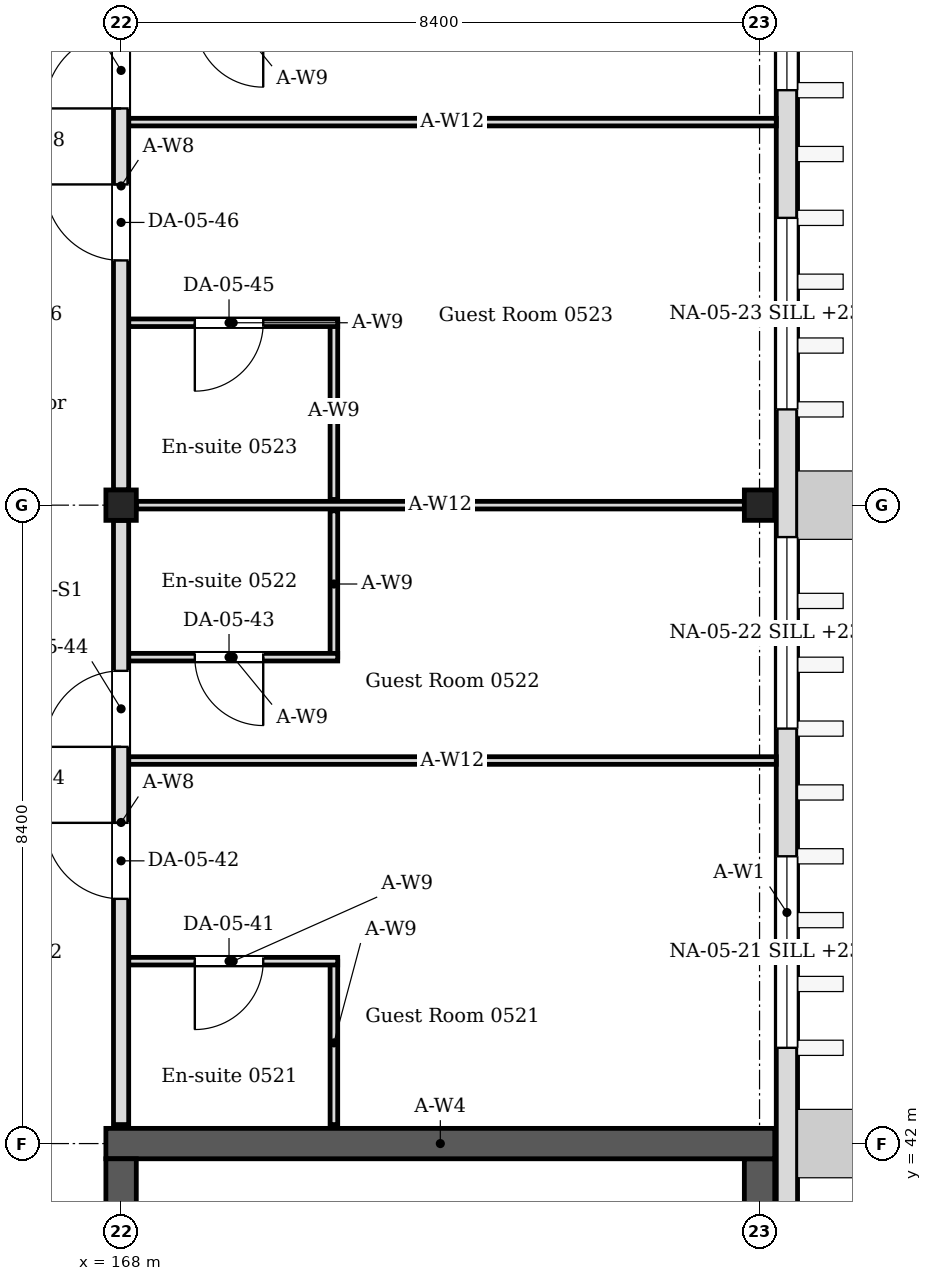
"""IFC4 building model, lengths in metres.
Left out: names, types, materials, properties, quantities, classifications, styles, units other than length and angle.
Written with IfcOpenShell. Run it as: python <this file> out.ifc"""

import sys

from ifc_helpers import new_model, si_unit, direction, frame, frame_2d, origin, origin_2d, place, context, subcontext, project, spatial, rectangle, i_section, extrude, element, fill, save


model = new_model("IFC4")
c1 = context("Model", 3, precision=1e-05, world=origin(), true_north=direction((0.0, 1.0)))
c2 = subcontext(c1, "Body", "Model", "MODEL_VIEW")
j1 = project(units=[si_unit("LENGTHUNIT", "METRE"), si_unit("PLANEANGLEUNIT", "RADIAN")], contexts=[c1])
p1 = place(None, origin())
s1 = spatial("IfcSite", under=j1, at=p1, CompositionType="ELEMENT")
p2 = place(p1, origin())
s2 = spatial("IfcBuilding", under=s1, at=p2, CompositionType="ELEMENT")
p3 = place(p2, frame((0.0, 0.0, 22.8)))
s3 = spatial("IfcBuildingStorey", under=s2, at=p3, CompositionType="ELEMENT", Elevation=22.8)
for number, where, z_axis, x_axis in (
    (1, (168.0, 50.4, 0.0), (0.0, 0.0, 1.0), (1.0, 0.0, 0.0)),
    (2, (176.4, 50.4, 0.0), (0.0, 0.0, 1.0), (1.0, 0.0, 0.0)),
):
    element("IfcColumn", number, at=place(p3, frame(where, z_axis=z_axis, x_axis=x_axis)), inside=s3, PredefinedType="COLUMN", context=c2, shape_type="SweptSolid", body=[
        extrude(i_section(OverallWidth=0.4, OverallDepth=0.4, WebThickness=0.013, FlangeThickness=0.021, FilletRadius=0.022, at=origin_2d()), origin(), (0.0, 0.0, 1.0), 4.2),
    ])
p4 = place(p3, frame((167.8, 42.0, 0.0), z_axis=(0.0, 0.0, 1.0), x_axis=(1.0, 0.0, 0.0)))
e3 = element("IfcWall", 3, at=p4, inside=s3, PredefinedType="SOLIDWALL", context=c2, shape_type="SweptSolid", body=[
    extrude(rectangle(XDim=8.8, YDim=0.4, at=frame_2d((4.4, 0.0))), origin(), (0.0, 0.0, 1.0), 4.05),
])
p5 = place(p3, frame((168.0, 25.4, 0.0), z_axis=(0.0, 0.0, 1.0), x_axis=(0.0, 1.0, 0.0)))
e4 = element("IfcWall", 4, at=p5, inside=s3, PredefinedType="SOLIDWALL", context=c2, shape_type="SweptSolid", body=[
    extrude(rectangle(XDim=16.4, YDim=0.4, at=frame_2d((8.2, 0.0))), origin(), (0.0, 0.0, 1.0), 4.05),
])
p6 = place(p5, frame((1.0, 0.0, 0.0)))
e5 = element("IfcOpeningElement", 5, at=p6, cuts=e4, PredefinedType="OPENING", context=c2, shape_type="SweptSolid", body=[
    extrude(rectangle(XDim=1.0, YDim=2.1, at=frame_2d((0.5, 1.05))), frame((0.0, 0.21, 0.0), z_axis=(0.0, -1.0, 0.0), x_axis=(1.0, 0.0, 0.0)), (0.0, 0.0, 1.0), 0.42),
])
p7 = place(p5, frame((14.4, 0.0, 0.0)))
e6 = element("IfcOpeningElement", 6, at=p7, cuts=e4, PredefinedType="OPENING", context=c2, shape_type="SweptSolid", body=[
    extrude(rectangle(XDim=1.4, YDim=2.1, at=frame_2d((0.7, 1.05))), frame((0.0, 0.21, 0.0), z_axis=(0.0, -1.0, 0.0), x_axis=(1.0, 0.0, 0.0)), (0.0, 0.0, 1.0), 0.42),
])
p8 = place(p3, frame((176.4, 25.4, 0.0), z_axis=(0.0, 0.0, 1.0), x_axis=(0.0, 1.0, 0.0)))
e7 = element("IfcWall", 7, at=p8, inside=s3, PredefinedType="SOLIDWALL", context=c2, shape_type="SweptSolid", body=[
    extrude(rectangle(XDim=16.4, YDim=0.4, at=frame_2d((8.2, 0.0))), origin(), (0.0, 0.0, 1.0), 4.05),
])
p9 = place(p3, frame((176.76, 24.85, 0.0), z_axis=(0.0, 0.0, 1.0), x_axis=(0.0, 1.0, 0.0)))
e8 = element("IfcWall", 8, at=p9, inside=s3, PredefinedType="SOLIDWALL", context=c2, shape_type="SweptSolid", body=[
    extrude(rectangle(XDim=42.57, YDim=0.28, at=frame_2d((21.285, 0.0))), origin(), (0.0, 0.0, 1.0), 4.05),
])
p10 = place(p9, frame((18.41, 0.0, 0.6)))
e9 = element("IfcOpeningElement", 9, at=p10, cuts=e8, PredefinedType="OPENING", context=c2, shape_type="SweptSolid", body=[
    extrude(rectangle(XDim=2.52, YDim=2.4, at=frame_2d((1.26, 1.2))), frame((0.0, 0.15, 0.0), z_axis=(0.0, -1.0, 0.0), x_axis=(1.0, 0.0, 0.0)), (0.0, 0.0, 1.0), 0.3),
])
p11 = place(p9, frame((22.61, 0.0, 0.6)))
e10 = element("IfcOpeningElement", 10, at=p11, cuts=e8, PredefinedType="OPENING", context=c2, shape_type="SweptSolid", body=[
    extrude(rectangle(XDim=2.52, YDim=2.4, at=frame_2d((1.26, 1.2))), frame((0.0, 0.15, 0.0), z_axis=(0.0, -1.0, 0.0), x_axis=(1.0, 0.0, 0.0)), (0.0, 0.0, 1.0), 0.3),
])
p12 = place(p9, frame((26.81, 0.0, 0.6)))
e11 = element("IfcOpeningElement", 11, at=p12, cuts=e8, PredefinedType="OPENING", context=c2, shape_type="SweptSolid", body=[
    extrude(rectangle(XDim=2.52, YDim=2.4, at=frame_2d((1.26, 1.2))), frame((0.0, 0.15, 0.0), z_axis=(0.0, -1.0, 0.0), x_axis=(1.0, 0.0, 0.0)), (0.0, 0.0, 1.0), 0.3),
])
p13 = place(p9, frame((31.01, 0.0, 0.6)))
e12 = element("IfcOpeningElement", 12, at=p13, cuts=e8, PredefinedType="OPENING", context=c2, shape_type="SweptSolid", body=[
    extrude(rectangle(XDim=2.52, YDim=2.4, at=frame_2d((1.26, 1.2))), frame((0.0, 0.15, 0.0), z_axis=(0.0, -1.0, 0.0), x_axis=(1.0, 0.0, 0.0)), (0.0, 0.0, 1.0), 0.3),
])
p14 = place(p3, frame((170.8, 42.25, 0.0), z_axis=(0.0, 0.0, 1.0), x_axis=(0.0, 1.0, 0.0)))
e13 = element("IfcWall", 13, at=p14, inside=s3, PredefinedType="PARTITIONING", context=c2, shape_type="SweptSolid", body=[
    extrude(rectangle(XDim=2.15, YDim=0.1, at=frame_2d((1.075, 0.0))), origin(), (0.0, 0.0, 1.0), 4.05),
])
p15 = place(p3, frame((170.85, 44.4, 0.0), z_axis=(0.0, 0.0, 1.0), x_axis=(-1.0, 0.0, 0.0)))
e14 = element("IfcWall", 14, at=p15, inside=s3, PredefinedType="PARTITIONING", context=c2, shape_type="SweptSolid", body=[
    extrude(rectangle(XDim=2.75, YDim=0.1, at=frame_2d((1.375, 0.0))), origin(), (0.0, 0.0, 1.0), 4.05),
])
p16 = place(p15, frame((0.98, 0.0, 0.0)))
e15 = element("IfcOpeningElement", 15, at=p16, cuts=e14, PredefinedType="OPENING", context=c2, shape_type="SweptSolid", body=[
    extrude(rectangle(XDim=0.9, YDim=2.1, at=frame_2d((0.45, 1.05))), frame((0.0, 0.06, 0.0), z_axis=(0.0, -1.0, 0.0), x_axis=(1.0, 0.0, 0.0)), (0.0, 0.0, 1.0), 0.12),
])
p17 = place(p3, frame((170.8, 48.4, 0.0), z_axis=(0.0, 0.0, 1.0), x_axis=(0.0, 1.0, 0.0)))
e16 = element("IfcWall", 16, at=p17, inside=s3, PredefinedType="PARTITIONING", context=c2, shape_type="SweptSolid", body=[
    extrude(rectangle(XDim=1.925, YDim=0.1, at=frame_2d((0.962, 0.0))), origin(), (0.0, 0.0, 1.0), 4.05),
])
p18 = place(p3, frame((170.85, 48.4, 0.0), z_axis=(0.0, 0.0, 1.0), x_axis=(-1.0, 0.0, 0.0)))
e17 = element("IfcWall", 17, at=p18, inside=s3, PredefinedType="PARTITIONING", context=c2, shape_type="SweptSolid", body=[
    extrude(rectangle(XDim=2.75, YDim=0.1, at=frame_2d((1.375, 0.0))), origin(), (0.0, 0.0, 1.0), 4.05),
])
p19 = place(p18, frame((0.98, 0.0, 0.0)))
e18 = element("IfcOpeningElement", 18, at=p19, cuts=e17, PredefinedType="OPENING", context=c2, shape_type="SweptSolid", body=[
    extrude(rectangle(XDim=0.9, YDim=2.1, at=frame_2d((0.45, 1.05))), frame((0.0, 0.06, 0.0), z_axis=(0.0, -1.0, 0.0), x_axis=(1.0, 0.0, 0.0)), (0.0, 0.0, 1.0), 0.12),
])
p20 = place(p3, frame((170.8, 50.475, 0.0), z_axis=(0.0, 0.0, 1.0), x_axis=(0.0, 1.0, 0.0)))
e19 = element("IfcWall", 19, at=p20, inside=s3, PredefinedType="PARTITIONING", context=c2, shape_type="SweptSolid", body=[
    extrude(rectangle(XDim=2.325, YDim=0.1, at=frame_2d((1.163, 0.0))), origin(), (0.0, 0.0, 1.0), 4.05),
])
p21 = place(p3, frame((170.85, 52.8, 0.0), z_axis=(0.0, 0.0, 1.0), x_axis=(-1.0, 0.0, 0.0)))
e20 = element("IfcWall", 20, at=p21, inside=s3, PredefinedType="PARTITIONING", context=c2, shape_type="SweptSolid", body=[
    extrude(rectangle(XDim=2.75, YDim=0.1, at=frame_2d((1.375, 0.0))), origin(), (0.0, 0.0, 1.0), 4.05),
])
p22 = place(p21, frame((0.98, 0.0, 0.0)))
e21 = element("IfcOpeningElement", 21, at=p22, cuts=e20, PredefinedType="OPENING", context=c2, shape_type="SweptSolid", body=[
    extrude(rectangle(XDim=0.9, YDim=2.1, at=frame_2d((0.45, 1.05))), frame((0.0, 0.06, 0.0), z_axis=(0.0, -1.0, 0.0), x_axis=(1.0, 0.0, 0.0)), (0.0, 0.0, 1.0), 0.12),
])
p23 = place(p3, frame((168.2, 50.4, 0.0), z_axis=(0.0, 0.0, 1.0), x_axis=(1.0, 0.0, 0.0)))
e22 = element("IfcWall", 22, at=p23, inside=s3, PredefinedType="PARTITIONING", context=c2, shape_type="SweptSolid", body=[
    extrude(rectangle(XDim=8.0, YDim=0.1, at=frame_2d((4.0, 0.0))), origin(), (0.0, 0.0, 1.0), 3.604),
])
for number, where, z_axis, x_axis in (
    (23, (168.1, 47.04, 0.0), (0.0, 0.0, 1.0), (1.0, 0.0, 0.0)),
    (24, (168.1, 55.44, 0.0), (0.0, 0.0, 1.0), (1.0, 0.0, 0.0)),
):
    element("IfcWall", number, at=place(p3, frame(where, z_axis=z_axis, x_axis=x_axis)), inside=s3, PredefinedType="PARTITIONING", context=c2, shape_type="SweptSolid", body=[
        extrude(rectangle(XDim=8.52, YDim=0.1, at=frame_2d((4.26, 0.0))), origin(), (0.0, 0.0, 1.0), 3.604),
    ])
p24 = place(p3, frame((168.0, 42.25, 0.0), z_axis=(0.0, 0.0, 1.0), x_axis=(0.0, 1.0, 0.0)))
e25 = element("IfcWall", 25, at=p24, inside=s3, PredefinedType="PARTITIONING", context=c2, shape_type="SweptSolid", body=[
    extrude(rectangle(XDim=7.95, YDim=0.2, at=frame_2d((3.975, 0.0))), origin(), (0.0, 0.0, 1.0), 3.45),
])
p25 = place(p24, frame((2.97, 0.0, 0.0)))
e26 = element("IfcOpeningElement", 26, at=p25, cuts=e25, PredefinedType="OPENING", context=c2, shape_type="SweptSolid", body=[
    extrude(rectangle(XDim=1.0, YDim=2.4, at=frame_2d((0.5, 1.2))), frame((0.0, 0.11, 0.0), z_axis=(0.0, -1.0, 0.0), x_axis=(1.0, 0.0, 0.0)), (0.0, 0.0, 1.0), 0.22),
])
p26 = place(p24, frame((4.97, 0.0, 0.0)))
e27 = element("IfcOpeningElement", 27, at=p26, cuts=e25, PredefinedType="OPENING", context=c2, shape_type="SweptSolid", body=[
    extrude(rectangle(XDim=1.0, YDim=2.4, at=frame_2d((0.5, 1.2))), frame((0.0, 0.11, 0.0), z_axis=(0.0, -1.0, 0.0), x_axis=(1.0, 0.0, 0.0)), (0.0, 0.0, 1.0), 0.22),
])
p27 = place(p3, frame((168.0, 50.6, 0.0), z_axis=(0.0, 0.0, 1.0), x_axis=(0.0, 1.0, 0.0)))
e28 = element("IfcWall", 28, at=p27, inside=s3, PredefinedType="PARTITIONING", context=c2, shape_type="SweptSolid", body=[
    extrude(rectangle(XDim=8.0, YDim=0.2, at=frame_2d((4.0, 0.0))), origin(), (0.0, 0.0, 1.0), 3.45),
])
p28 = place(p27, frame((3.02, 0.0, 0.0)))
e29 = element("IfcOpeningElement", 29, at=p28, cuts=e28, PredefinedType="OPENING", context=c2, shape_type="SweptSolid", body=[
    extrude(rectangle(XDim=1.0, YDim=2.4, at=frame_2d((0.5, 1.2))), frame((0.0, 0.11, 0.0), z_axis=(0.0, -1.0, 0.0), x_axis=(1.0, 0.0, 0.0)), (0.0, 0.0, 1.0), 0.22),
])
p29 = place(p27, frame((5.02, 0.0, 0.0)))
e30 = element("IfcOpeningElement", 30, at=p29, cuts=e28, PredefinedType="OPENING", context=c2, shape_type="SweptSolid", body=[
    extrude(rectangle(XDim=1.0, YDim=2.4, at=frame_2d((0.5, 1.2))), frame((0.0, 0.11, 0.0), z_axis=(0.0, -1.0, 0.0), x_axis=(1.0, 0.0, 0.0)), (0.0, 0.0, 1.0), 0.22),
])
p30 = place(p10, origin())
e31 = element("IfcWindow", 31, at=p30, inside=s3, PartitioningType="SINGLE_PANEL", PredefinedType="WINDOW", context=c2, shape_type="SweptSolid", body=[
    extrude(rectangle(XDim=2.52, YDim=2.4, at=frame_2d((1.26, 1.2))), frame((0.0, 0.03, 0.0), z_axis=(0.0, -1.0, 0.0), x_axis=(1.0, 0.0, 0.0)), (0.0, 0.0, 1.0), 0.06),
])
fill(e9, e31)
p31 = place(p11, origin())
e32 = element("IfcWindow", 32, at=p31, inside=s3, PartitioningType="SINGLE_PANEL", PredefinedType="WINDOW", context=c2, shape_type="SweptSolid", body=[
    extrude(rectangle(XDim=2.52, YDim=2.4, at=frame_2d((1.26, 1.2))), frame((0.0, 0.03, 0.0), z_axis=(0.0, -1.0, 0.0), x_axis=(1.0, 0.0, 0.0)), (0.0, 0.0, 1.0), 0.06),
])
fill(e10, e32)
p32 = place(p12, origin())
e33 = element("IfcWindow", 33, at=p32, inside=s3, PartitioningType="SINGLE_PANEL", PredefinedType="WINDOW", context=c2, shape_type="SweptSolid", body=[
    extrude(rectangle(XDim=2.52, YDim=2.4, at=frame_2d((1.26, 1.2))), frame((0.0, 0.03, 0.0), z_axis=(0.0, -1.0, 0.0), x_axis=(1.0, 0.0, 0.0)), (0.0, 0.0, 1.0), 0.06),
])
fill(e11, e33)
p33 = place(p13, origin())
e34 = element("IfcWindow", 34, at=p33, inside=s3, PartitioningType="SINGLE_PANEL", PredefinedType="WINDOW", context=c2, shape_type="SweptSolid", body=[
    extrude(rectangle(XDim=2.52, YDim=2.4, at=frame_2d((1.26, 1.2))), frame((0.0, 0.03, 0.0), z_axis=(0.0, -1.0, 0.0), x_axis=(1.0, 0.0, 0.0)), (0.0, 0.0, 1.0), 0.06),
])
fill(e12, e34)
p34 = place(p16, origin())
e35 = element("IfcDoor", 35, at=p34, inside=s3, OperationType="SINGLE_SWING_RIGHT", PredefinedType="DOOR", context=c2, shape_type="SweptSolid", body=[
    extrude(rectangle(XDim=0.9, YDim=2.1, at=frame_2d((0.45, 1.05))), frame((0.0, 0.025, 0.0), z_axis=(0.0, -1.0, 0.0), x_axis=(1.0, 0.0, 0.0)), (0.0, 0.0, 1.0), 0.05),
])
fill(e15, e35)
p35 = place(p25, origin())
e36 = element("IfcDoor", 36, at=p35, inside=s3, OperationType="SINGLE_SWING_RIGHT", PredefinedType="DOOR", context=c2, shape_type="SweptSolid", body=[
    extrude(rectangle(XDim=1.0, YDim=2.4, at=frame_2d((0.5, 1.2))), frame((0.0, 0.025, 0.0), z_axis=(0.0, -1.0, 0.0), x_axis=(1.0, 0.0, 0.0)), (0.0, 0.0, 1.0), 0.05),
])
fill(e26, e36)
p36 = place(p19, origin())
e37 = element("IfcDoor", 37, at=p36, inside=s3, OperationType="SINGLE_SWING_LEFT", PredefinedType="DOOR", context=c2, shape_type="SweptSolid", body=[
    extrude(rectangle(XDim=0.9, YDim=2.1, at=frame_2d((0.45, 1.05))), frame((0.0, 0.025, 0.0), z_axis=(0.0, -1.0, 0.0), x_axis=(1.0, 0.0, 0.0)), (0.0, 0.0, 1.0), 0.05),
])
fill(e18, e37)
p37 = place(p26, origin())
e38 = element("IfcDoor", 38, at=p37, inside=s3, OperationType="SINGLE_SWING_LEFT", PredefinedType="DOOR", context=c2, shape_type="SweptSolid", body=[
    extrude(rectangle(XDim=1.0, YDim=2.4, at=frame_2d((0.5, 1.2))), frame((0.0, 0.025, 0.0), z_axis=(0.0, -1.0, 0.0), x_axis=(1.0, 0.0, 0.0)), (0.0, 0.0, 1.0), 0.05),
])
fill(e27, e38)
p38 = place(p22, origin())
e39 = element("IfcDoor", 39, at=p38, inside=s3, OperationType="SINGLE_SWING_RIGHT", PredefinedType="DOOR", context=c2, shape_type="SweptSolid", body=[
    extrude(rectangle(XDim=0.9, YDim=2.1, at=frame_2d((0.45, 1.05))), frame((0.0, 0.025, 0.0), z_axis=(0.0, -1.0, 0.0), x_axis=(1.0, 0.0, 0.0)), (0.0, 0.0, 1.0), 0.05),
])
fill(e21, e39)
p39 = place(p28, origin())
e40 = element("IfcDoor", 40, at=p39, inside=s3, OperationType="SINGLE_SWING_RIGHT", PredefinedType="DOOR", context=c2, shape_type="SweptSolid", body=[
    extrude(rectangle(XDim=1.0, YDim=2.4, at=frame_2d((0.5, 1.2))), frame((0.0, 0.025, 0.0), z_axis=(0.0, -1.0, 0.0), x_axis=(1.0, 0.0, 0.0)), (0.0, 0.0, 1.0), 0.05),
])
fill(e29, e40)
p40 = place(p29, origin())
e41 = element("IfcDoor", 41, at=p40, inside=s3, OperationType="SINGLE_SWING_LEFT", PredefinedType="DOOR", context=c2, shape_type="SweptSolid", body=[
    extrude(rectangle(XDim=1.0, YDim=2.4, at=frame_2d((0.5, 1.2))), frame((0.0, 0.025, 0.0), z_axis=(0.0, -1.0, 0.0), x_axis=(1.0, 0.0, 0.0)), (0.0, 0.0, 1.0), 0.05),
])
fill(e30, e41)
save(model, sys.argv[1])
